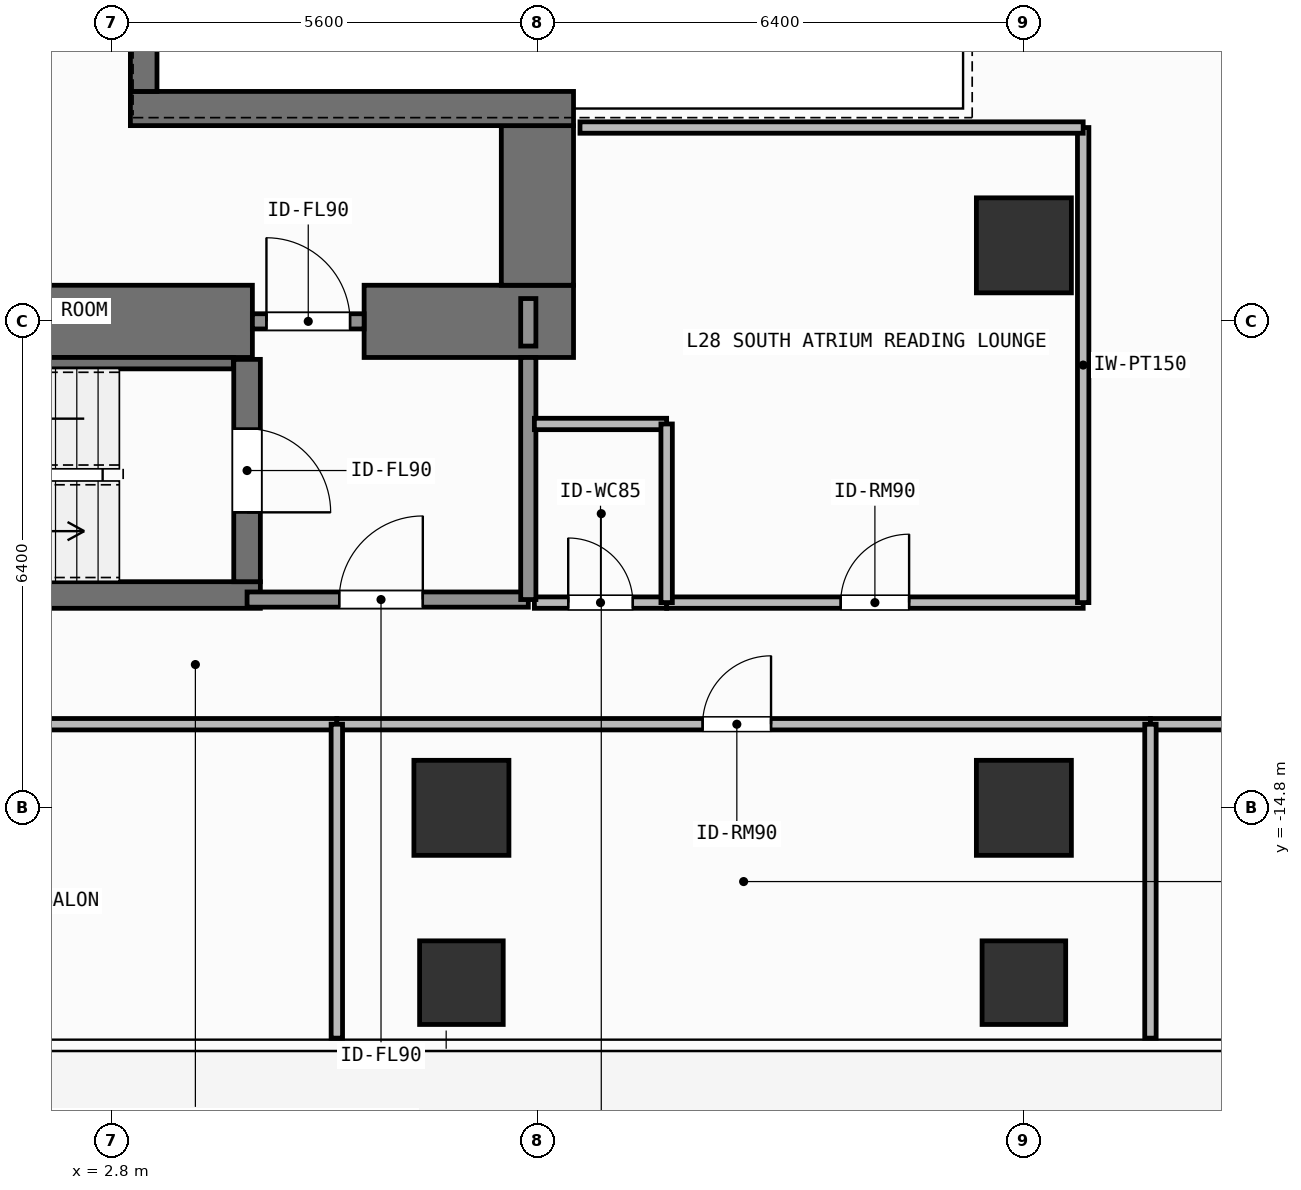
"""IFC4 building model, lengths in metres.
Left out: names, types, materials, properties, quantities, classifications, styles, units other than length and angle.
Written with IfcOpenShell. Run it as: python <this file> out.ifc"""

import sys

from ifc_helpers import new_model, si_unit, direction, frame, frame_2d, origin, origin_2d, place, context, subcontext, project, spatial, rectangle, extrude, element, fill, save


model = new_model("IFC4")
c1 = context("Model", 3, precision=1e-05, world=origin(), true_north=direction((0.0, 1.0)))
c2 = subcontext(c1, "Body", "Model", "MODEL_VIEW")
j1 = project(units=[si_unit("LENGTHUNIT", "METRE"), si_unit("PLANEANGLEUNIT", "RADIAN")], contexts=[c1])
p1 = place(None, origin())
s1 = spatial("IfcSite", under=j1, at=p1, CompositionType="ELEMENT")
p2 = place(p1, origin())
s2 = spatial("IfcBuilding", under=s1, at=p2, CompositionType="ELEMENT")
p3 = place(p2, frame((0.0, 0.0, 113.4)))
s3 = spatial("IfcBuildingStorey", under=s2, at=p3, CompositionType="ELEMENT", Elevation=113.4)
p4 = place(p3, frame((-2.62, -8.4, 0.0), z_axis=(0.0, 0.0, 1.0), x_axis=(1.0, 0.0, 0.0)))
e1 = element("IfcWall", 1, at=p4, inside=s3, PredefinedType="SHEAR", context=c2, shape_type="SweptSolid", body=[
    extrude(rectangle(XDim=7.27, YDim=0.95, at=frame_2d((3.635, 0.0))), origin(), (0.0, 0.0, 1.0), 3.9),
])
p5 = place(p3, frame((6.12, -8.4, 0.0), z_axis=(0.0, 0.0, 1.0), x_axis=(1.0, 0.0, 0.0)))
e2 = element("IfcWall", 2, at=p5, inside=s3, PredefinedType="SHEAR", context=c2, shape_type="SweptSolid", body=[
    extrude(rectangle(XDim=2.755, YDim=0.95, at=frame_2d((1.377, 0.0))), origin(), (0.0, 0.0, 1.0), 3.9),
])
p6 = place(p3, frame((8.4, -7.925, 0.0), z_axis=(0.0, 0.0, 1.0), x_axis=(0.0, 1.0, 0.0)))
e3 = element("IfcWall", 3, at=p6, inside=s3, PredefinedType="SHEAR", context=c2, shape_type="SweptSolid", body=[
    extrude(rectangle(XDim=2.1, YDim=0.95, at=frame_2d((1.05, 0.0))), origin(), (0.0, 0.0, 1.0), 3.9),
])
p7 = place(p3, frame((3.045, -5.6, 0.0), z_axis=(0.0, 0.0, 1.0), x_axis=(1.0, 0.0, 0.0)))
e4 = element("IfcWall", 4, at=p7, inside=s3, PredefinedType="SHEAR", context=c2, shape_type="SweptSolid", body=[
    extrude(rectangle(XDim=5.83, YDim=0.45, at=frame_2d((2.915, 0.0))), origin(), (0.0, 0.0, 1.0), 3.9),
])
p8 = place(p3, frame((3.22, -5.375, 0.0), z_axis=(0.0, 0.0, 1.0), x_axis=(0.0, 1.0, 0.0)))
e5 = element("IfcWall", 5, at=p8, inside=s3, PredefinedType="SHEAR", context=c2, shape_type="SweptSolid", body=[
    extrude(rectangle(XDim=10.75, YDim=0.35, at=frame_2d((5.375, 0.0))), origin(), (0.0, 0.0, 1.0), 3.9),
])
p9 = place(p3, frame((-2.555, -12.0, 0.0), z_axis=(0.0, 0.0, 1.0), x_axis=(1.0, 0.0, 0.0)))
e6 = element("IfcWall", 6, at=p9, inside=s3, PredefinedType="SHEAR", context=c2, shape_type="SweptSolid", body=[
    extrude(rectangle(XDim=7.31, YDim=0.35, at=frame_2d((3.655, 0.0))), origin(), (0.0, 0.0, 1.0), 3.9),
])
p10 = place(p3, frame((-2.2, -8.95, 0.0), z_axis=(0.0, 0.0, 1.0), x_axis=(1.0, 0.0, 0.0)))
e7 = element("IfcWall", 7, at=p10, inside=s3, PredefinedType="SHEAR", context=c2, shape_type="SweptSolid", body=[
    extrude(rectangle(XDim=6.6, YDim=0.15, at=frame_2d((3.3, 0.0))), origin(), (0.0, 0.0, 1.0), 3.9),
])
p11 = place(p3, frame((4.58, -8.9, 0.0), z_axis=(0.0, 0.0, 1.0), x_axis=(0.0, -1.0, 0.0)))
e8 = element("IfcWall", 8, at=p11, inside=s3, PredefinedType="SHEAR", context=c2, shape_type="SweptSolid", body=[
    extrude(rectangle(XDim=2.925, YDim=0.35, at=frame_2d((1.462, 0.0))), origin(), (0.0, 0.0, 1.0), 3.9),
])
p12 = place(p11, frame((0.913, 0.0, 0.0)))
e9 = element("IfcOpeningElement", 9, at=p12, cuts=e8, PredefinedType="OPENING", context=c2, shape_type="SweptSolid", body=[
    extrude(rectangle(XDim=1.1, YDim=2.15, at=frame_2d((0.55, 1.075))), frame((0.0, 0.185, 0.0), z_axis=(0.0, -1.0, 0.0), x_axis=(1.0, 0.0, 0.0)), (0.0, 0.0, 1.0), 0.37),
])
for number, where, z_axis, x_axis in (
    (10, (7.4, -14.8, 0.0), (0.0, 0.0, 1.0), (1.0, 0.0, 0.0)),
    (11, (14.8, -14.8, 0.0), (0.0, 0.0, 1.0), (1.0, 0.0, 0.0)),
    (12, (14.8, -7.4, 0.0), (0.0, 0.0, 1.0), (1.0, 0.0, 0.0)),
):
    element("IfcColumn", number, at=place(p3, frame(where, z_axis=z_axis, x_axis=x_axis)), inside=s3, PredefinedType="COLUMN", context=c2, shape_type="SweptSolid", body=[
        extrude(rectangle(XDim=1.25, YDim=1.25, at=origin_2d()), origin(), (0.0, 0.0, 1.0), 3.9),
    ])
for number, where, z_axis, x_axis in (
    (13, (7.4, -17.1, 0.0), (0.0, 0.0, 1.0), (1.0, 0.0, 0.0)),
    (14, (14.8, -17.1, 0.0), (0.0, 0.0, 1.0), (1.0, 0.0, 0.0)),
):
    element("IfcColumn", number, at=place(p3, frame(where, z_axis=z_axis, x_axis=x_axis)), inside=s3, PredefinedType="COLUMN", context=c2, shape_type="SweptSolid", body=[
        extrude(rectangle(XDim=1.1, YDim=1.1, at=origin_2d()), origin(), (0.0, 0.0, 1.0), 3.9),
    ])
p13 = place(p3, frame((4.58, -12.06, 0.0), z_axis=(0.0, 0.0, 1.0), x_axis=(1.0, 0.0, 0.0)))
e15 = element("IfcWall", 15, at=p13, inside=s3, PredefinedType="SOLIDWALL", context=c2, shape_type="SweptSolid", body=[
    extrude(rectangle(XDim=3.7, YDim=0.2, at=frame_2d((1.85, 0.0))), origin(), (0.0, 0.0, 1.0), 3.68),
])
p14 = place(p13, frame((1.212, 0.0, 0.0)))
e16 = element("IfcOpeningElement", 16, at=p14, cuts=e15, PredefinedType="OPENING", context=c2, shape_type="SweptSolid", body=[
    extrude(rectangle(XDim=1.1, YDim=2.15, at=frame_2d((0.55, 1.075))), frame((0.0, 0.11, 0.0), z_axis=(0.0, -1.0, 0.0), x_axis=(1.0, 0.0, 0.0)), (0.0, 0.0, 1.0), 0.22),
])
p15 = place(p3, frame((4.65, -8.4, 0.0), z_axis=(0.0, 0.0, 1.0), x_axis=(1.0, 0.0, 0.0)))
e17 = element("IfcWall", 17, at=p15, inside=s3, PredefinedType="SOLIDWALL", context=c2, shape_type="SweptSolid", body=[
    extrude(rectangle(XDim=1.47, YDim=0.2, at=frame_2d((0.735, 0.0))), origin(), (0.0, 0.0, 1.0), 2.72),
])
p16 = place(p15, frame((0.185, 0.0, 0.0)))
e18 = element("IfcOpeningElement", 18, at=p16, cuts=e17, PredefinedType="OPENING", context=c2, shape_type="SweptSolid", body=[
    extrude(rectangle(XDim=1.1, YDim=2.15, at=frame_2d((0.55, 1.075))), frame((0.0, 0.11, 0.0), z_axis=(0.0, -1.0, 0.0), x_axis=(1.0, 0.0, 0.0)), (0.0, 0.0, 1.0), 0.22),
])
p17 = place(p3, frame((8.36, -12.1, 0.0), z_axis=(0.0, 0.0, 1.0), x_axis=(1.0, 0.0, 0.0)))
e19 = element("IfcWall", 19, at=p17, inside=s3, PredefinedType="PARTITIONING", context=c2, shape_type="SweptSolid", body=[
    extrude(rectangle(XDim=1.74, YDim=0.15, at=frame_2d((0.87, 0.0))), origin(), (0.0, 0.0, 1.0), 3.68),
])
p18 = place(p17, frame((0.445, 0.0, 0.0)))
e20 = element("IfcOpeningElement", 20, at=p18, cuts=e19, PredefinedType="OPENING", context=c2, shape_type="SweptSolid", body=[
    extrude(rectangle(XDim=0.85, YDim=2.1, at=frame_2d((0.425, 1.05))), frame((0.0, 0.085, 0.0), z_axis=(0.0, -1.0, 0.0), x_axis=(1.0, 0.0, 0.0)), (0.0, 0.0, 1.0), 0.17),
])
p19 = place(p3, frame((10.1, -12.1, 0.0), z_axis=(0.0, 0.0, 1.0), x_axis=(1.0, 0.0, 0.0)))
e21 = element("IfcWall", 21, at=p19, inside=s3, PredefinedType="PARTITIONING", context=c2, shape_type="SweptSolid", body=[
    extrude(rectangle(XDim=5.48, YDim=0.15, at=frame_2d((2.74, 0.0))), origin(), (0.0, 0.0, 1.0), 3.68),
])
p20 = place(p19, frame((2.29, 0.0, 0.0)))
e22 = element("IfcOpeningElement", 22, at=p20, cuts=e21, PredefinedType="OPENING", context=c2, shape_type="SweptSolid", body=[
    extrude(rectangle(XDim=0.9, YDim=2.1, at=frame_2d((0.45, 1.05))), frame((0.0, 0.085, 0.0), z_axis=(0.0, -1.0, 0.0), x_axis=(1.0, 0.0, 0.0)), (0.0, 0.0, 1.0), 0.17),
])
p21 = place(p3, frame((-4.012, -13.7, 0.0), z_axis=(0.0, 0.0, 1.0), x_axis=(1.0, 0.0, 0.0)))
e23 = element("IfcWall", 23, at=p21, inside=s3, PredefinedType="PARTITIONING", context=c2, shape_type="SweptSolid", body=[
    extrude(rectangle(XDim=9.773, YDim=0.15, at=frame_2d((4.886, 0.0))), origin(), (0.0, 0.0, 1.0), 3.68),
])
p22 = place(p21, frame((4.793, 0.0, 0.0)))
e24 = element("IfcOpeningElement", 24, at=p22, cuts=e23, PredefinedType="OPENING", context=c2, shape_type="SweptSolid", body=[
    extrude(rectangle(XDim=0.9, YDim=2.1, at=frame_2d((0.45, 1.05))), frame((0.0, 0.085, 0.0), z_axis=(0.0, -1.0, 0.0), x_axis=(1.0, 0.0, 0.0)), (0.0, 0.0, 1.0), 0.17),
])
p23 = place(p3, frame((5.761, -13.7, 0.0), z_axis=(0.0, 0.0, 1.0), x_axis=(1.0, 0.0, 0.0)))
e25 = element("IfcWall", 25, at=p23, inside=s3, PredefinedType="PARTITIONING", context=c2, shape_type="SweptSolid", body=[
    extrude(rectangle(XDim=10.704, YDim=0.15, at=frame_2d((5.352, 0.0))), origin(), (0.0, 0.0, 1.0), 3.68),
])
p24 = place(p23, frame((4.812, 0.0, 0.0)))
e26 = element("IfcOpeningElement", 26, at=p24, cuts=e25, PredefinedType="OPENING", context=c2, shape_type="SweptSolid", body=[
    extrude(rectangle(XDim=0.9, YDim=2.1, at=frame_2d((0.45, 1.05))), frame((0.0, 0.085, 0.0), z_axis=(0.0, -1.0, 0.0), x_axis=(1.0, 0.0, 0.0)), (0.0, 0.0, 1.0), 0.17),
])
p25 = place(p3, frame((16.465, -13.7, 0.0), z_axis=(0.0, 0.0, 1.0), x_axis=(1.0, 0.0, 0.0)))
e27 = element("IfcWall", 27, at=p25, inside=s3, PredefinedType="PARTITIONING", context=c2, shape_type="SweptSolid", body=[
    extrude(rectangle(XDim=10.665, YDim=0.15, at=frame_2d((5.333, 0.0))), origin(), (0.0, 0.0, 1.0), 3.68),
])
p26 = place(p25, frame((4.793, 0.0, 0.0)))
e28 = element("IfcOpeningElement", 28, at=p26, cuts=e27, PredefinedType="OPENING", context=c2, shape_type="SweptSolid", body=[
    extrude(rectangle(XDim=0.9, YDim=2.1, at=frame_2d((0.45, 1.05))), frame((0.0, 0.085, 0.0), z_axis=(0.0, -1.0, 0.0), x_axis=(1.0, 0.0, 0.0)), (0.0, 0.0, 1.0), 0.17),
])
p27 = place(p3, frame((8.28, -12.06, 0.0), z_axis=(0.0, 0.0, 1.0), x_axis=(0.0, 1.0, 0.0)))
e29 = element("IfcWall", 29, at=p27, inside=s3, PredefinedType="SOLIDWALL", context=c2, shape_type="SweptSolid", body=[
    extrude(rectangle(XDim=3.185, YDim=0.2, at=frame_2d((1.593, 0.0))), origin(), (0.0, 0.0, 1.0), 3.68),
])
p28 = place(p3, frame((8.28, -8.725, 0.0), z_axis=(0.0, 0.0, 1.0), x_axis=(0.0, 1.0, 0.0)))
e30 = element("IfcWall", 30, at=p28, inside=s3, PredefinedType="SOLIDWALL", context=c2, shape_type="SweptSolid", body=[
    extrude(rectangle(XDim=0.625, YDim=0.2, at=frame_2d((0.312, 0.0))), origin(), (0.0, 0.0, 1.0), 3.68),
])
p29 = place(p3, frame((8.36, -9.75, 0.0), z_axis=(0.0, 0.0, 1.0), x_axis=(1.0, 0.0, 0.0)))
e31 = element("IfcWall", 31, at=p29, inside=s3, PredefinedType="PARTITIONING", context=c2, shape_type="SweptSolid", body=[
    extrude(rectangle(XDim=1.74, YDim=0.15, at=frame_2d((0.87, 0.0))), origin(), (0.0, 0.0, 1.0), 3.68),
])
p30 = place(p3, frame((10.1, -12.1, 0.0), z_axis=(0.0, 0.0, 1.0), x_axis=(0.0, 1.0, 0.0)))
e32 = element("IfcWall", 32, at=p30, inside=s3, PredefinedType="PARTITIONING", context=c2, shape_type="SweptSolid", body=[
    extrude(rectangle(XDim=2.35, YDim=0.15, at=frame_2d((1.175, 0.0))), origin(), (0.0, 0.0, 1.0), 3.68),
])
p31 = place(p3, frame((15.58, -12.1, 0.0), z_axis=(0.0, 0.0, 1.0), x_axis=(0.0, 1.0, 0.0)))
e33 = element("IfcWall", 33, at=p31, inside=s3, PredefinedType="PARTITIONING", context=c2, shape_type="SweptSolid", body=[
    extrude(rectangle(XDim=6.25, YDim=0.15, at=frame_2d((3.125, 0.0))), origin(), (0.0, 0.0, 1.0), 3.68),
])
p32 = place(p3, frame((8.96, -5.85, 0.0), z_axis=(0.0, 0.0, 1.0), x_axis=(1.0, 0.0, 0.0)))
e34 = element("IfcWall", 34, at=p32, inside=s3, PredefinedType="PARTITIONING", context=c2, shape_type="SweptSolid", body=[
    extrude(rectangle(XDim=6.62, YDim=0.15, at=frame_2d((3.31, 0.0))), origin(), (0.0, 0.0, 1.0), 3.68),
])
for number, where, z_axis, x_axis in (
    (35, (5.761, -17.83, 0.0), (0.0, 0.0, 1.0), (0.0, 1.0, 0.0)),
    (36, (16.465, -17.83, 0.0), (0.0, 0.0, 1.0), (0.0, 1.0, 0.0)),
):
    element("IfcWall", number, at=place(p3, frame(where, z_axis=z_axis, x_axis=x_axis)), inside=s3, PredefinedType="PARTITIONING", context=c2, shape_type="SweptSolid", body=[
        extrude(rectangle(XDim=4.13, YDim=0.15, at=frame_2d((2.065, 0.0))), origin(), (0.0, 0.0, 1.0), 3.68),
    ])
p33 = place(p12, origin())
e37 = element("IfcDoor", 37, at=p33, inside=s3, OperationType="SINGLE_SWING_RIGHT", PredefinedType="DOOR", context=c2, shape_type="SweptSolid", body=[
    extrude(rectangle(XDim=1.1, YDim=2.15, at=frame_2d((0.55, 1.075))), frame((0.0, 0.025, 0.0), z_axis=(0.0, -1.0, 0.0), x_axis=(1.0, 0.0, 0.0)), (0.0, 0.0, 1.0), 0.05),
])
fill(e9, e37)
p34 = place(p14, origin())
e38 = element("IfcDoor", 38, at=p34, inside=s3, OperationType="SINGLE_SWING_RIGHT", PredefinedType="DOOR", context=c2, shape_type="SweptSolid", body=[
    extrude(rectangle(XDim=1.1, YDim=2.15, at=frame_2d((0.55, 1.075))), frame((0.0, 0.025, 0.0), z_axis=(0.0, -1.0, 0.0), x_axis=(1.0, 0.0, 0.0)), (0.0, 0.0, 1.0), 0.05),
])
fill(e16, e38)
p35 = place(p16, origin())
e39 = element("IfcDoor", 39, at=p35, inside=s3, OperationType="SINGLE_SWING_LEFT", PredefinedType="DOOR", context=c2, shape_type="SweptSolid", body=[
    extrude(rectangle(XDim=1.1, YDim=2.15, at=frame_2d((0.55, 1.075))), frame((0.0, 0.025, 0.0), z_axis=(0.0, -1.0, 0.0), x_axis=(1.0, 0.0, 0.0)), (0.0, 0.0, 1.0), 0.05),
])
fill(e18, e39)
p36 = place(p18, origin())
e40 = element("IfcDoor", 40, at=p36, inside=s3, OperationType="SINGLE_SWING_LEFT", PredefinedType="DOOR", context=c2, shape_type="SweptSolid", body=[
    extrude(rectangle(XDim=0.85, YDim=2.1, at=frame_2d((0.425, 1.05))), frame((0.0, 0.025, 0.0), z_axis=(0.0, -1.0, 0.0), x_axis=(1.0, 0.0, 0.0)), (0.0, 0.0, 1.0), 0.05),
])
fill(e20, e40)
p37 = place(p20, origin())
e41 = element("IfcDoor", 41, at=p37, inside=s3, OperationType="SINGLE_SWING_RIGHT", PredefinedType="DOOR", context=c2, shape_type="SweptSolid", body=[
    extrude(rectangle(XDim=0.9, YDim=2.1, at=frame_2d((0.45, 1.05))), frame((0.0, 0.025, 0.0), z_axis=(0.0, -1.0, 0.0), x_axis=(1.0, 0.0, 0.0)), (0.0, 0.0, 1.0), 0.05),
])
fill(e22, e41)
p38 = place(p24, origin())
e42 = element("IfcDoor", 42, at=p38, inside=s3, OperationType="SINGLE_SWING_RIGHT", PredefinedType="DOOR", context=c2, shape_type="SweptSolid", body=[
    extrude(rectangle(XDim=0.9, YDim=2.1, at=frame_2d((0.45, 1.05))), frame((0.0, 0.025, 0.0), z_axis=(0.0, -1.0, 0.0), x_axis=(1.0, 0.0, 0.0)), (0.0, 0.0, 1.0), 0.05),
])
fill(e26, e42)
save(model, sys.argv[1])
